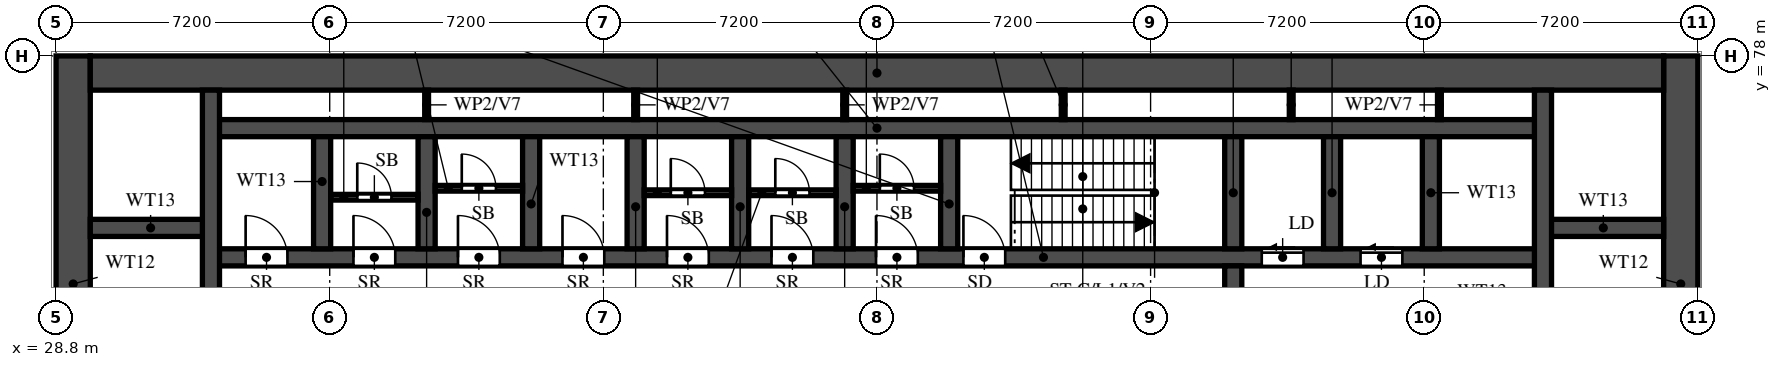
"""IFC4 building model, lengths in metres.
Left out: names, types, materials, properties, quantities, classifications, styles, units other than length and angle.
Written with IfcOpenShell. Run it as: python <this file> out.ifc"""

import sys

from ifc_helpers import new_model, si_unit, direction, frame, frame_2d, origin, place, context, subcontext, project, spatial, rectangle, extrude, element, fill, save


model = new_model("IFC4")
c1 = context("Model", 3, precision=1e-05, world=origin(), true_north=direction((0.0, 1.0)))
c2 = subcontext(c1, "Body", "Model", "MODEL_VIEW")
j1 = project(units=[si_unit("LENGTHUNIT", "METRE"), si_unit("PLANEANGLEUNIT", "RADIAN")], contexts=[c1])
p1 = place(None, origin())
s1 = spatial("IfcSite", under=j1, at=p1, CompositionType="ELEMENT")
p2 = place(p1, origin())
s2 = spatial("IfcBuilding", under=s1, at=p2, CompositionType="ELEMENT")
p3 = place(p2, frame((0.0, 0.0, 7.8)))
s3 = spatial("IfcBuildingStorey", under=s2, at=p3, CompositionType="ELEMENT", Elevation=7.8)
for number, where, z_axis, x_axis in (
    (1, (29.25, 66.0, 0.0), (0.0, 0.0, 1.0), (0.0, 1.0, 0.0)),
    (2, (71.55, 66.0, 0.0), (0.0, 0.0, 1.0), (0.0, 1.0, 0.0)),
):
    element("IfcWall", number, at=place(p3, frame(where, z_axis=z_axis, x_axis=x_axis)), inside=s3, PredefinedType="SHEAR", context=c2, shape_type="SweptSolid", body=[
        extrude(rectangle(XDim=12.0, YDim=0.9, at=frame_2d((6.0, 0.0))), origin(), (0.0, 0.0, 1.0), 5.0),
    ])
p4 = place(p3, frame((29.7, 77.55, 0.0), z_axis=(0.0, 0.0, 1.0), x_axis=(1.0, 0.0, 0.0)))
e3 = element("IfcWall", 3, at=p4, inside=s3, PredefinedType="SHEAR", context=c2, shape_type="SweptSolid", body=[
    extrude(rectangle(XDim=41.4, YDim=0.9, at=frame_2d((20.7, 0.0))), origin(), (0.0, 0.0, 1.0), 5.0),
])
p5 = place(p3, frame((32.875, 72.7, 0.0), z_axis=(0.0, 0.0, 1.0), x_axis=(1.0, 0.0, 0.0)))
e4 = element("IfcWall", 4, at=p5, inside=s3, PredefinedType="SHEAR", context=c2, shape_type="SweptSolid", body=[
    extrude(rectangle(XDim=35.05, YDim=0.45, at=frame_2d((17.525, 0.0))), origin(), (0.0, 0.0, 1.0), 5.0),
])
p6 = place(p5, frame((19.8, 0.0, 0.0)))
e5 = element("IfcOpeningElement", 5, at=p6, cuts=e4, PredefinedType="OPENING", context=c2, shape_type="SweptSolid", body=[
    extrude(rectangle(XDim=1.1, YDim=2.1, at=frame_2d((0.55, 1.05))), frame((0.0, 0.235, 0.0), z_axis=(0.0, -1.0, 0.0), x_axis=(1.0, 0.0, 0.0)), (0.0, 0.0, 1.0), 0.47),
])
p7 = place(p5, frame((27.65, 0.0, 0.0)))
e6 = element("IfcOpeningElement", 6, at=p7, cuts=e4, PredefinedType="OPENING", context=c2, shape_type="SweptSolid", body=[
    extrude(rectangle(XDim=1.1, YDim=2.1, at=frame_2d((0.55, 1.05))), frame((0.0, 0.235, 0.0), z_axis=(0.0, -1.0, 0.0), x_axis=(1.0, 0.0, 0.0)), (0.0, 0.0, 1.0), 0.47),
])
p8 = place(p5, frame((30.25, 0.0, 0.0)))
e7 = element("IfcOpeningElement", 7, at=p8, cuts=e4, PredefinedType="OPENING", context=c2, shape_type="SweptSolid", body=[
    extrude(rectangle(XDim=1.1, YDim=2.1, at=frame_2d((0.55, 1.05))), frame((0.0, 0.235, 0.0), z_axis=(0.0, -1.0, 0.0), x_axis=(1.0, 0.0, 0.0)), (0.0, 0.0, 1.0), 0.47),
])
p9 = place(p5, frame((3.75, 0.0, 0.0)))
e8 = element("IfcOpeningElement", 8, at=p9, cuts=e4, PredefinedType="OPENING", context=c2, shape_type="SweptSolid", body=[
    extrude(rectangle(XDim=1.1, YDim=2.1, at=frame_2d((0.55, 1.05))), frame((0.0, 0.235, 0.0), z_axis=(0.0, -1.0, 0.0), x_axis=(1.0, 0.0, 0.0)), (0.0, 0.0, 1.0), 0.47),
])
p10 = place(p5, frame((6.5, 0.0, 0.0)))
e9 = element("IfcOpeningElement", 9, at=p10, cuts=e4, PredefinedType="OPENING", context=c2, shape_type="SweptSolid", body=[
    extrude(rectangle(XDim=1.1, YDim=2.1, at=frame_2d((0.55, 1.05))), frame((0.0, 0.235, 0.0), z_axis=(0.0, -1.0, 0.0), x_axis=(1.0, 0.0, 0.0)), (0.0, 0.0, 1.0), 0.47),
])
p11 = place(p5, frame((9.25, 0.0, 0.0)))
e10 = element("IfcOpeningElement", 10, at=p11, cuts=e4, PredefinedType="OPENING", context=c2, shape_type="SweptSolid", body=[
    extrude(rectangle(XDim=1.1, YDim=2.1, at=frame_2d((0.55, 1.05))), frame((0.0, 0.235, 0.0), z_axis=(0.0, -1.0, 0.0), x_axis=(1.0, 0.0, 0.0)), (0.0, 0.0, 1.0), 0.47),
])
p12 = place(p5, frame((12.0, 0.0, 0.0)))
e11 = element("IfcOpeningElement", 11, at=p12, cuts=e4, PredefinedType="OPENING", context=c2, shape_type="SweptSolid", body=[
    extrude(rectangle(XDim=1.1, YDim=2.1, at=frame_2d((0.55, 1.05))), frame((0.0, 0.235, 0.0), z_axis=(0.0, -1.0, 0.0), x_axis=(1.0, 0.0, 0.0)), (0.0, 0.0, 1.0), 0.47),
])
p13 = place(p5, frame((14.75, 0.0, 0.0)))
e12 = element("IfcOpeningElement", 12, at=p13, cuts=e4, PredefinedType="OPENING", context=c2, shape_type="SweptSolid", body=[
    extrude(rectangle(XDim=1.1, YDim=2.1, at=frame_2d((0.55, 1.05))), frame((0.0, 0.235, 0.0), z_axis=(0.0, -1.0, 0.0), x_axis=(1.0, 0.0, 0.0)), (0.0, 0.0, 1.0), 0.47),
])
p14 = place(p5, frame((17.5, 0.0, 0.0)))
e13 = element("IfcOpeningElement", 13, at=p14, cuts=e4, PredefinedType="OPENING", context=c2, shape_type="SweptSolid", body=[
    extrude(rectangle(XDim=1.1, YDim=2.1, at=frame_2d((0.55, 1.05))), frame((0.0, 0.235, 0.0), z_axis=(0.0, -1.0, 0.0), x_axis=(1.0, 0.0, 0.0)), (0.0, 0.0, 1.0), 0.47),
])
p15 = place(p5, frame((0.913, 0.0, 0.0)))
e14 = element("IfcOpeningElement", 14, at=p15, cuts=e4, PredefinedType="OPENING", context=c2, shape_type="SweptSolid", body=[
    extrude(rectangle(XDim=1.1, YDim=2.1, at=frame_2d((0.55, 1.05))), frame((0.0, 0.235, 0.0), z_axis=(0.0, -1.0, 0.0), x_axis=(1.0, 0.0, 0.0)), (0.0, 0.0, 1.0), 0.47),
])
p16 = place(p3, frame((32.875, 76.1, 0.0), z_axis=(0.0, 0.0, 1.0), x_axis=(1.0, 0.0, 0.0)))
e15 = element("IfcWall", 15, at=p16, inside=s3, PredefinedType="SHEAR", context=c2, shape_type="SweptSolid", body=[
    extrude(rectangle(XDim=35.05, YDim=0.45, at=frame_2d((17.525, 0.0))), origin(), (0.0, 0.0, 1.0), 5.0),
])
for number, where, z_axis, x_axis in (
    (16, (29.7, 73.475, 0.0), (0.0, 0.0, 1.0), (1.0, 0.0, 0.0)),
    (17, (67.925, 73.475, 0.0), (0.0, 0.0, 1.0), (1.0, 0.0, 0.0)),
):
    element("IfcWall", number, at=place(p3, frame(where, z_axis=z_axis, x_axis=x_axis)), inside=s3, PredefinedType="SHEAR", context=c2, shape_type="SweptSolid", body=[
        extrude(rectangle(XDim=3.175, YDim=0.45, at=frame_2d((1.587, 0.0))), origin(), (0.0, 0.0, 1.0), 5.0),
    ])
p17 = place(p3, frame((32.875, 66.45, 0.0), z_axis=(0.0, 0.0, 1.0), x_axis=(0.0, 1.0, 0.0)))
e18 = element("IfcWall", 18, at=p17, inside=s3, PredefinedType="SHEAR", context=c2, shape_type="SweptSolid", body=[
    extrude(rectangle(XDim=10.65, YDim=0.45, at=frame_2d((5.325, 0.0))), origin(), (0.0, 0.0, 1.0), 5.0),
])
p18 = place(p3, frame((67.925, 66.45, 0.0), z_axis=(0.0, 0.0, 1.0), x_axis=(0.0, 1.0, 0.0)))
e19 = element("IfcWall", 19, at=p18, inside=s3, PredefinedType="SHEAR", context=c2, shape_type="SweptSolid", body=[
    extrude(rectangle(XDim=10.65, YDim=0.45, at=frame_2d((5.325, 0.0))), origin(), (0.0, 0.0, 1.0), 5.0),
])
p19 = place(p18, frame((0.15, 0.0, 0.0)))
e20 = element("IfcOpeningElement", 20, at=p19, cuts=e19, PredefinedType="OPENING", context=c2, shape_type="SweptSolid", body=[
    extrude(rectangle(XDim=1.1, YDim=2.1, at=frame_2d((0.55, 1.05))), frame((0.0, 0.235, 0.0), z_axis=(0.0, -1.0, 0.0), x_axis=(1.0, 0.0, 0.0)), (0.0, 0.0, 1.0), 0.47),
])
p20 = place(p3, frame((59.775, 66.45, 0.0), z_axis=(0.0, 0.0, 1.0), x_axis=(0.0, 1.0, 0.0)))
e21 = element("IfcWall", 21, at=p20, inside=s3, PredefinedType="SHEAR", context=c2, shape_type="SweptSolid", body=[
    extrude(rectangle(XDim=6.025, YDim=0.45, at=frame_2d((3.013, 0.0))), origin(), (0.0, 0.0, 1.0), 5.0),
])
p21 = place(p20, frame((3.85, 0.0, 0.0)))
e22 = element("IfcOpeningElement", 22, at=p21, cuts=e21, PredefinedType="OPENING", context=c2, shape_type="SweptSolid", body=[
    extrude(rectangle(XDim=1.2, YDim=2.1, at=frame_2d((0.6, 1.05))), frame((0.0, 0.235, 0.0), z_axis=(0.0, -1.0, 0.0), x_axis=(1.0, 0.0, 0.0)), (0.0, 0.0, 1.0), 0.47),
])
for number, where, z_axis, x_axis in (
    (23, (59.775, 72.925, 0.0), (0.0, 0.0, 1.0), (0.0, 1.0, 0.0)),
    (24, (35.8, 72.925, 0.0), (0.0, 0.0, 1.0), (0.0, 1.0, 0.0)),
    (25, (38.55, 72.925, 0.0), (0.0, 0.0, 1.0), (0.0, 1.0, 0.0)),
    (26, (41.3, 72.925, 0.0), (0.0, 0.0, 1.0), (0.0, 1.0, 0.0)),
    (27, (44.05, 72.925, 0.0), (0.0, 0.0, 1.0), (0.0, 1.0, 0.0)),
    (28, (46.8, 72.925, 0.0), (0.0, 0.0, 1.0), (0.0, 1.0, 0.0)),
    (29, (49.55, 72.925, 0.0), (0.0, 0.0, 1.0), (0.0, 1.0, 0.0)),
    (30, (52.3, 72.925, 0.0), (0.0, 0.0, 1.0), (0.0, 1.0, 0.0)),
    (31, (62.375, 72.925, 0.0), (0.0, 0.0, 1.0), (0.0, 1.0, 0.0)),
    (32, (64.975, 72.925, 0.0), (0.0, 0.0, 1.0), (0.0, 1.0, 0.0)),
):
    element("IfcWall", number, at=place(p3, frame(where, z_axis=z_axis, x_axis=x_axis)), inside=s3, PredefinedType="SHEAR", context=c2, shape_type="SweptSolid", body=[
        extrude(rectangle(XDim=2.95, YDim=0.45, at=frame_2d((1.475, 0.0))), origin(), (0.0, 0.0, 1.0), 5.0),
    ])
p22 = place(p3, frame((36.025, 74.282, 0.0), z_axis=(0.0, 0.0, 1.0), x_axis=(1.0, 0.0, 0.0)))
e33 = element("IfcWall", 33, at=p22, inside=s3, PredefinedType="PARTITIONING", context=c2, shape_type="SweptSolid", body=[
    extrude(rectangle(XDim=2.3, YDim=0.15, at=frame_2d((1.15, 0.0))), origin(), (0.0, 0.0, 1.0), 5.0),
])
p23 = place(p22, frame((0.7, 0.0, 0.0)))
e34 = element("IfcOpeningElement", 34, at=p23, cuts=e33, PredefinedType="OPENING", context=c2, shape_type="SweptSolid", body=[
    extrude(rectangle(XDim=0.9, YDim=2.1, at=frame_2d((0.45, 1.05))), frame((0.0, 0.085, 0.0), z_axis=(0.0, -1.0, 0.0), x_axis=(1.0, 0.0, 0.0)), (0.0, 0.0, 1.0), 0.17),
])
p24 = place(p3, frame((38.775, 74.518, 0.0), z_axis=(0.0, 0.0, 1.0), x_axis=(1.0, 0.0, 0.0)))
e35 = element("IfcWall", 35, at=p24, inside=s3, PredefinedType="PARTITIONING", context=c2, shape_type="SweptSolid", body=[
    extrude(rectangle(XDim=2.3, YDim=0.15, at=frame_2d((1.15, 0.0))), origin(), (0.0, 0.0, 1.0), 5.0),
])
p25 = place(p24, frame((0.7, 0.0, 0.0)))
e36 = element("IfcOpeningElement", 36, at=p25, cuts=e35, PredefinedType="OPENING", context=c2, shape_type="SweptSolid", body=[
    extrude(rectangle(XDim=0.9, YDim=2.1, at=frame_2d((0.45, 1.05))), frame((0.0, 0.085, 0.0), z_axis=(0.0, -1.0, 0.0), x_axis=(1.0, 0.0, 0.0)), (0.0, 0.0, 1.0), 0.17),
])
p26 = place(p3, frame((44.275, 74.4, 0.0), z_axis=(0.0, 0.0, 1.0), x_axis=(1.0, 0.0, 0.0)))
e37 = element("IfcWall", 37, at=p26, inside=s3, PredefinedType="PARTITIONING", context=c2, shape_type="SweptSolid", body=[
    extrude(rectangle(XDim=2.3, YDim=0.15, at=frame_2d((1.15, 0.0))), origin(), (0.0, 0.0, 1.0), 5.0),
])
p27 = place(p26, frame((0.7, 0.0, 0.0)))
e38 = element("IfcOpeningElement", 38, at=p27, cuts=e37, PredefinedType="OPENING", context=c2, shape_type="SweptSolid", body=[
    extrude(rectangle(XDim=0.9, YDim=2.1, at=frame_2d((0.45, 1.05))), frame((0.0, 0.085, 0.0), z_axis=(0.0, -1.0, 0.0), x_axis=(1.0, 0.0, 0.0)), (0.0, 0.0, 1.0), 0.17),
])
p28 = place(p3, frame((47.025, 74.4, 0.0), z_axis=(0.0, 0.0, 1.0), x_axis=(1.0, 0.0, 0.0)))
e39 = element("IfcWall", 39, at=p28, inside=s3, PredefinedType="PARTITIONING", context=c2, shape_type="SweptSolid", body=[
    extrude(rectangle(XDim=2.3, YDim=0.15, at=frame_2d((1.15, 0.0))), origin(), (0.0, 0.0, 1.0), 5.0),
])
p29 = place(p28, frame((0.7, 0.0, 0.0)))
e40 = element("IfcOpeningElement", 40, at=p29, cuts=e39, PredefinedType="OPENING", context=c2, shape_type="SweptSolid", body=[
    extrude(rectangle(XDim=0.9, YDim=2.1, at=frame_2d((0.45, 1.05))), frame((0.0, 0.085, 0.0), z_axis=(0.0, -1.0, 0.0), x_axis=(1.0, 0.0, 0.0)), (0.0, 0.0, 1.0), 0.17),
])
p30 = place(p3, frame((49.775, 74.518, 0.0), z_axis=(0.0, 0.0, 1.0), x_axis=(1.0, 0.0, 0.0)))
e41 = element("IfcWall", 41, at=p30, inside=s3, PredefinedType="PARTITIONING", context=c2, shape_type="SweptSolid", body=[
    extrude(rectangle(XDim=2.3, YDim=0.15, at=frame_2d((1.15, 0.0))), origin(), (0.0, 0.0, 1.0), 5.0),
])
p31 = place(p30, frame((0.7, 0.0, 0.0)))
e42 = element("IfcOpeningElement", 42, at=p31, cuts=e41, PredefinedType="OPENING", context=c2, shape_type="SweptSolid", body=[
    extrude(rectangle(XDim=0.9, YDim=2.1, at=frame_2d((0.45, 1.05))), frame((0.0, 0.085, 0.0), z_axis=(0.0, -1.0, 0.0), x_axis=(1.0, 0.0, 0.0)), (0.0, 0.0, 1.0), 0.17),
])
for number, where, z_axis, x_axis in (
    (43, (38.55, 76.325, 0.0), (0.0, 0.0, 1.0), (0.0, 1.0, 0.0)),
    (44, (44.05, 76.325, 0.0), (0.0, 0.0, 1.0), (0.0, 1.0, 0.0)),
    (45, (49.55, 76.325, 0.0), (0.0, 0.0, 1.0), (0.0, 1.0, 0.0)),
    (46, (55.3, 76.325, 0.0), (0.0, 0.0, 1.0), (0.0, 1.0, 0.0)),
    (47, (61.3, 76.325, 0.0), (0.0, 0.0, 1.0), (0.0, 1.0, 0.0)),
    (48, (65.2, 76.325, 0.0), (0.0, 0.0, 1.0), (0.0, 1.0, 0.0)),
):
    element("IfcWall", number, at=place(p3, frame(where, z_axis=z_axis, x_axis=x_axis)), inside=s3, PredefinedType="PARTITIONING", context=c2, shape_type="SweptSolid", body=[
        extrude(rectangle(XDim=0.775, YDim=0.1, at=frame_2d((0.388, 0.0))), origin(), (0.0, 0.0, 1.0), 5.0),
    ])
p32 = place(p6, origin())
e49 = element("IfcDoor", 49, at=p32, inside=s3, OperationType="SINGLE_SWING_LEFT", PredefinedType="DOOR", context=c2, shape_type="SweptSolid", body=[
    extrude(rectangle(XDim=1.1, YDim=2.1, at=frame_2d((0.55, 1.05))), frame((0.0, 0.025, 0.0), z_axis=(0.0, -1.0, 0.0), x_axis=(1.0, 0.0, 0.0)), (0.0, 0.0, 1.0), 0.05),
])
fill(e5, e49)
p33 = place(p7, origin())
e50 = element("IfcDoor", 50, at=p33, inside=s3, OperationType="SLIDING_TO_LEFT", PredefinedType="DOOR", context=c2, shape_type="SweptSolid", body=[
    extrude(rectangle(XDim=1.1, YDim=2.1, at=frame_2d((0.55, 1.05))), frame((0.0, 0.025, 0.0), z_axis=(0.0, -1.0, 0.0), x_axis=(1.0, 0.0, 0.0)), (0.0, 0.0, 1.0), 0.05),
])
fill(e6, e50)
p34 = place(p8, origin())
e51 = element("IfcDoor", 51, at=p34, inside=s3, OperationType="SLIDING_TO_LEFT", PredefinedType="DOOR", context=c2, shape_type="SweptSolid", body=[
    extrude(rectangle(XDim=1.1, YDim=2.1, at=frame_2d((0.55, 1.05))), frame((0.0, 0.025, 0.0), z_axis=(0.0, -1.0, 0.0), x_axis=(1.0, 0.0, 0.0)), (0.0, 0.0, 1.0), 0.05),
])
fill(e7, e51)
p35 = place(p9, origin())
e52 = element("IfcDoor", 52, at=p35, inside=s3, OperationType="SINGLE_SWING_LEFT", PredefinedType="DOOR", context=c2, shape_type="SweptSolid", body=[
    extrude(rectangle(XDim=1.1, YDim=2.1, at=frame_2d((0.55, 1.05))), frame((0.0, 0.025, 0.0), z_axis=(0.0, -1.0, 0.0), x_axis=(1.0, 0.0, 0.0)), (0.0, 0.0, 1.0), 0.05),
])
fill(e8, e52)
p36 = place(p23, origin())
e53 = element("IfcDoor", 53, at=p36, inside=s3, OperationType="SINGLE_SWING_LEFT", PredefinedType="DOOR", context=c2, shape_type="SweptSolid", body=[
    extrude(rectangle(XDim=0.9, YDim=2.1, at=frame_2d((0.45, 1.05))), frame((0.0, 0.025, 0.0), z_axis=(0.0, -1.0, 0.0), x_axis=(1.0, 0.0, 0.0)), (0.0, 0.0, 1.0), 0.05),
])
fill(e34, e53)
p37 = place(p10, origin())
e54 = element("IfcDoor", 54, at=p37, inside=s3, OperationType="SINGLE_SWING_LEFT", PredefinedType="DOOR", context=c2, shape_type="SweptSolid", body=[
    extrude(rectangle(XDim=1.1, YDim=2.1, at=frame_2d((0.55, 1.05))), frame((0.0, 0.025, 0.0), z_axis=(0.0, -1.0, 0.0), x_axis=(1.0, 0.0, 0.0)), (0.0, 0.0, 1.0), 0.05),
])
fill(e9, e54)
p38 = place(p25, origin())
e55 = element("IfcDoor", 55, at=p38, inside=s3, OperationType="SINGLE_SWING_LEFT", PredefinedType="DOOR", context=c2, shape_type="SweptSolid", body=[
    extrude(rectangle(XDim=0.9, YDim=2.1, at=frame_2d((0.45, 1.05))), frame((0.0, 0.025, 0.0), z_axis=(0.0, -1.0, 0.0), x_axis=(1.0, 0.0, 0.0)), (0.0, 0.0, 1.0), 0.05),
])
fill(e36, e55)
p39 = place(p11, origin())
e56 = element("IfcDoor", 56, at=p39, inside=s3, OperationType="SINGLE_SWING_LEFT", PredefinedType="DOOR", context=c2, shape_type="SweptSolid", body=[
    extrude(rectangle(XDim=1.1, YDim=2.1, at=frame_2d((0.55, 1.05))), frame((0.0, 0.025, 0.0), z_axis=(0.0, -1.0, 0.0), x_axis=(1.0, 0.0, 0.0)), (0.0, 0.0, 1.0), 0.05),
])
fill(e10, e56)
p40 = place(p12, origin())
e57 = element("IfcDoor", 57, at=p40, inside=s3, OperationType="SINGLE_SWING_LEFT", PredefinedType="DOOR", context=c2, shape_type="SweptSolid", body=[
    extrude(rectangle(XDim=1.1, YDim=2.1, at=frame_2d((0.55, 1.05))), frame((0.0, 0.025, 0.0), z_axis=(0.0, -1.0, 0.0), x_axis=(1.0, 0.0, 0.0)), (0.0, 0.0, 1.0), 0.05),
])
fill(e11, e57)
p41 = place(p27, origin())
e58 = element("IfcDoor", 58, at=p41, inside=s3, OperationType="SINGLE_SWING_RIGHT", PredefinedType="DOOR", context=c2, shape_type="SweptSolid", body=[
    extrude(rectangle(XDim=0.9, YDim=2.1, at=frame_2d((0.45, 1.05))), frame((0.0, 0.025, 0.0), z_axis=(0.0, -1.0, 0.0), x_axis=(1.0, 0.0, 0.0)), (0.0, 0.0, 1.0), 0.05),
])
fill(e38, e58)
p42 = place(p13, origin())
e59 = element("IfcDoor", 59, at=p42, inside=s3, OperationType="SINGLE_SWING_LEFT", PredefinedType="DOOR", context=c2, shape_type="SweptSolid", body=[
    extrude(rectangle(XDim=1.1, YDim=2.1, at=frame_2d((0.55, 1.05))), frame((0.0, 0.025, 0.0), z_axis=(0.0, -1.0, 0.0), x_axis=(1.0, 0.0, 0.0)), (0.0, 0.0, 1.0), 0.05),
])
fill(e12, e59)
p43 = place(p29, origin())
e60 = element("IfcDoor", 60, at=p43, inside=s3, OperationType="SINGLE_SWING_LEFT", PredefinedType="DOOR", context=c2, shape_type="SweptSolid", body=[
    extrude(rectangle(XDim=0.9, YDim=2.1, at=frame_2d((0.45, 1.05))), frame((0.0, 0.025, 0.0), z_axis=(0.0, -1.0, 0.0), x_axis=(1.0, 0.0, 0.0)), (0.0, 0.0, 1.0), 0.05),
])
fill(e40, e60)
p44 = place(p14, origin())
e61 = element("IfcDoor", 61, at=p44, inside=s3, OperationType="SINGLE_SWING_LEFT", PredefinedType="DOOR", context=c2, shape_type="SweptSolid", body=[
    extrude(rectangle(XDim=1.1, YDim=2.1, at=frame_2d((0.55, 1.05))), frame((0.0, 0.025, 0.0), z_axis=(0.0, -1.0, 0.0), x_axis=(1.0, 0.0, 0.0)), (0.0, 0.0, 1.0), 0.05),
])
fill(e13, e61)
p45 = place(p31, origin())
e62 = element("IfcDoor", 62, at=p45, inside=s3, OperationType="SINGLE_SWING_LEFT", PredefinedType="DOOR", context=c2, shape_type="SweptSolid", body=[
    extrude(rectangle(XDim=0.9, YDim=2.1, at=frame_2d((0.45, 1.05))), frame((0.0, 0.025, 0.0), z_axis=(0.0, -1.0, 0.0), x_axis=(1.0, 0.0, 0.0)), (0.0, 0.0, 1.0), 0.05),
])
fill(e42, e62)
p46 = place(p15, origin())
e63 = element("IfcDoor", 63, at=p46, inside=s3, OperationType="SINGLE_SWING_LEFT", PredefinedType="DOOR", context=c2, shape_type="SweptSolid", body=[
    extrude(rectangle(XDim=1.1, YDim=2.1, at=frame_2d((0.55, 1.05))), frame((0.0, 0.025, 0.0), z_axis=(0.0, -1.0, 0.0), x_axis=(1.0, 0.0, 0.0)), (0.0, 0.0, 1.0), 0.05),
])
fill(e14, e63)
save(model, sys.argv[1])
